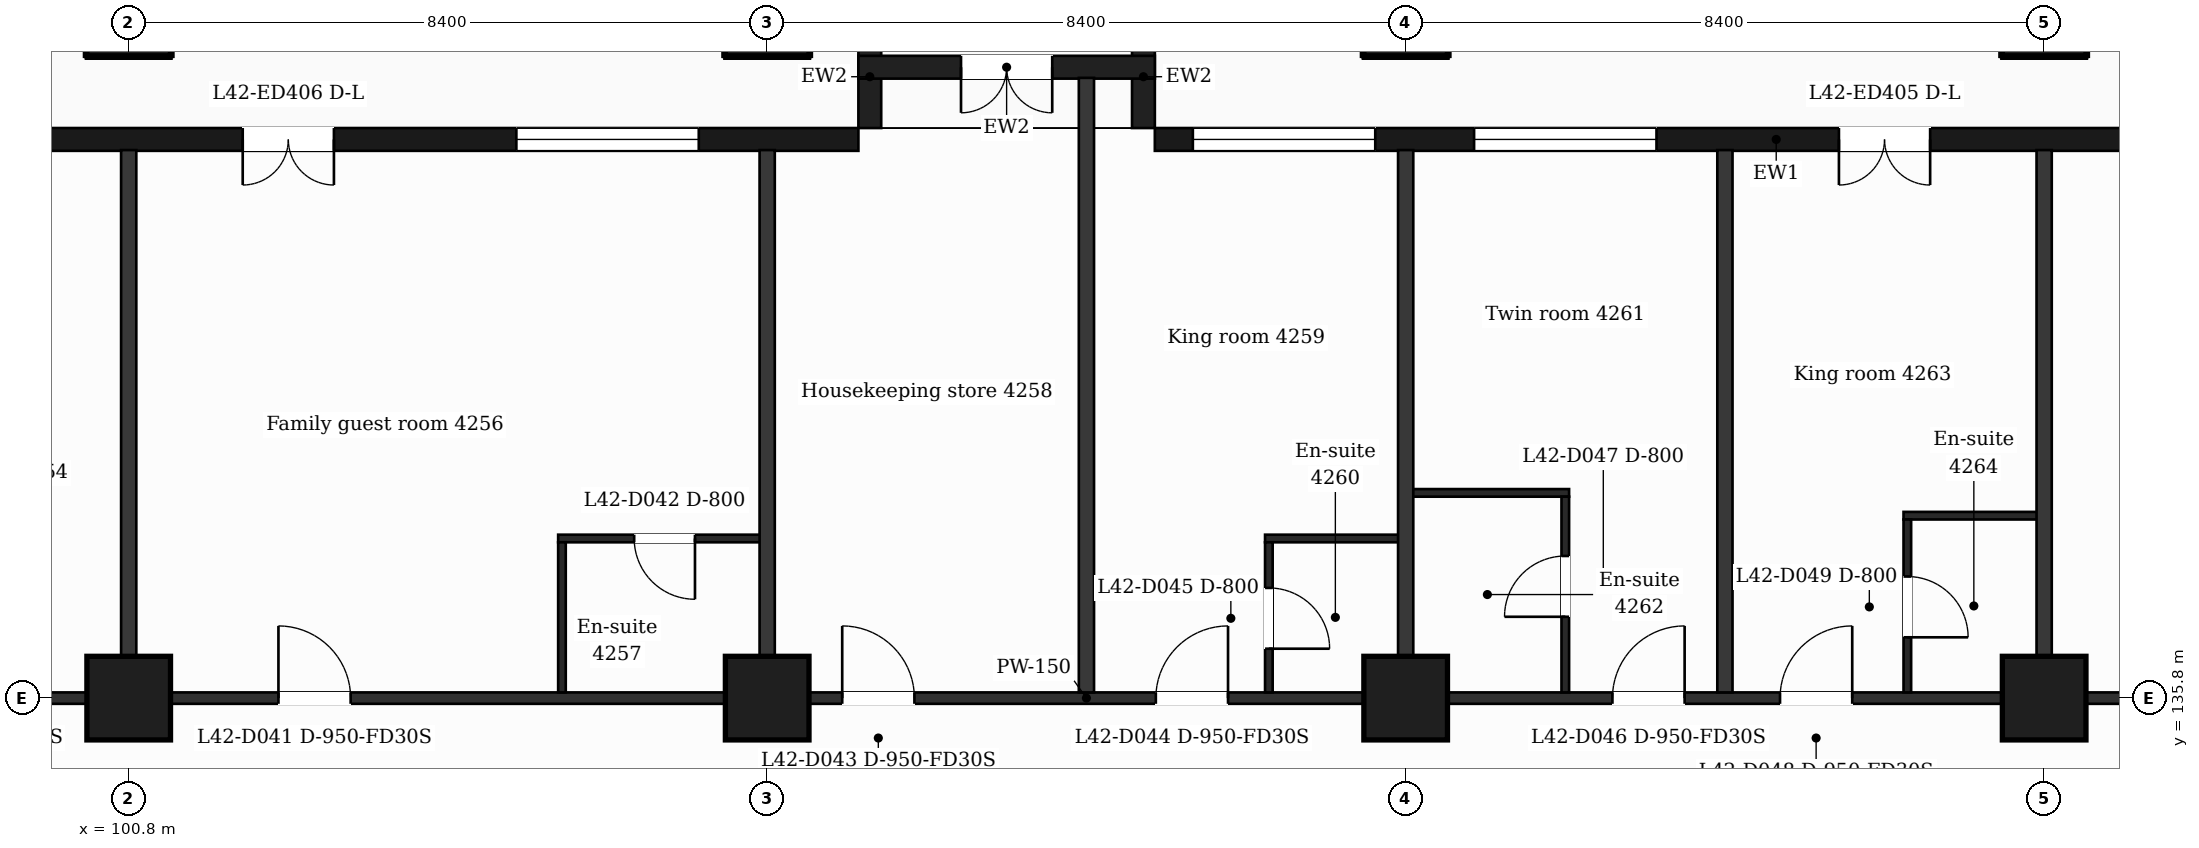
"""IFC4 building model, lengths in metres.
Left out: names, types, materials, properties, quantities, classifications, styles, units other than length and angle.
Written with IfcOpenShell. Run it as: python <this file> out.ifc"""

import sys

from ifc_helpers import new_model, si_unit, direction, frame, frame_2d, origin, origin_2d, place, context, subcontext, project, spatial, rectangle, extrude, element, fill, save


model = new_model("IFC4")
c1 = context("Model", 3, precision=1e-05, world=origin(), true_north=direction((0.0, 1.0)))
c2 = subcontext(c1, "Body", "Model", "MODEL_VIEW")
j1 = project(units=[si_unit("LENGTHUNIT", "METRE"), si_unit("PLANEANGLEUNIT", "RADIAN")], contexts=[c1])
p1 = place(None, origin())
s1 = spatial("IfcSite", under=j1, at=p1, CompositionType="ELEMENT")
p2 = place(p1, origin())
s2 = spatial("IfcBuilding", under=s1, at=p2, CompositionType="ELEMENT")
p3 = place(p2, frame((0.0, 0.0, 177.4)))
s3 = spatial("IfcBuildingStorey", under=s2, at=p3, CompositionType="ELEMENT", Elevation=177.4)
for number, where, z_axis, x_axis in (
    (1, (100.8, 135.8, 0.0), (0.0, 0.0, 1.0), (1.0, 0.0, 0.0)),
    (2, (109.2, 135.8, 0.0), (0.0, 0.0, 1.0), (1.0, 0.0, 0.0)),
    (3, (117.6, 135.8, 0.0), (0.0, 0.0, 1.0), (1.0, 0.0, 0.0)),
    (4, (126.0, 135.8, 0.0), (0.0, 0.0, 1.0), (1.0, 0.0, 0.0)),
    (5, (100.8, 144.8, 0.0), (0.0, 0.0, 1.0), (1.0, 0.0, 0.0)),
    (6, (109.2, 144.8, 0.0), (0.0, 0.0, 1.0), (1.0, 0.0, 0.0)),
    (7, (117.6, 144.8, 0.0), (0.0, 0.0, 1.0), (1.0, 0.0, 0.0)),
    (8, (126.0, 144.8, 0.0), (0.0, 0.0, 1.0), (1.0, 0.0, 0.0)),
):
    element("IfcColumn", number, at=place(p3, frame(where, z_axis=z_axis, x_axis=x_axis)), inside=s3, PredefinedType="COLUMN", context=c2, shape_type="SweptSolid", body=[
        extrude(rectangle(XDim=1.1, YDim=1.1, at=origin_2d()), origin(), (0.0, 0.0, 1.0), 3.7),
    ])
p4 = place(p3, frame((130.65, 143.15, 0.0), z_axis=(0.0, 0.0, 1.0), x_axis=(-1.0, 0.0, 0.0)))
e9 = element("IfcWall", 9, at=p4, inside=s3, PredefinedType="SOLIDWALL", context=c2, shape_type="SweptSolid", body=[
    extrude(rectangle(XDim=16.35, YDim=0.3, at=frame_2d((8.175, 0.0))), origin(), (0.0, 0.0, 1.0), 3.38),
])
p5 = place(p4, frame((1.95, 0.0, 0.9)))
e10 = element("IfcOpeningElement", 10, at=p5, cuts=e9, PredefinedType="OPENING", context=c2, shape_type="SweptSolid", body=[
    extrude(rectangle(XDim=1.2, YDim=2.1, at=frame_2d((0.6, 1.05))), frame((0.0, 0.16, 0.0), z_axis=(0.0, -1.0, 0.0), x_axis=(1.0, 0.0, 0.0)), (0.0, 0.0, 1.0), 0.32),
])
p6 = place(p4, frame((6.15, 0.0, 0.0)))
e11 = element("IfcOpeningElement", 11, at=p6, cuts=e9, PredefinedType="OPENING", context=c2, shape_type="SweptSolid", body=[
    extrude(rectangle(XDim=1.2, YDim=2.4, at=frame_2d((0.6, 1.2))), frame((0.0, 0.16, 0.0), z_axis=(0.0, -1.0, 0.0), x_axis=(1.0, 0.0, 0.0)), (0.0, 0.0, 1.0), 0.32),
])
p7 = place(p4, frame((9.75, 0.0, 0.9)))
e12 = element("IfcOpeningElement", 12, at=p7, cuts=e9, PredefinedType="OPENING", context=c2, shape_type="SweptSolid", body=[
    extrude(rectangle(XDim=2.4, YDim=2.1, at=frame_2d((1.2, 1.05))), frame((0.0, 0.16, 0.0), z_axis=(0.0, -1.0, 0.0), x_axis=(1.0, 0.0, 0.0)), (0.0, 0.0, 1.0), 0.32),
])
p8 = place(p4, frame((13.45, 0.0, 0.9)))
e13 = element("IfcOpeningElement", 13, at=p8, cuts=e9, PredefinedType="OPENING", context=c2, shape_type="SweptSolid", body=[
    extrude(rectangle(XDim=2.4, YDim=2.1, at=frame_2d((1.2, 1.05))), frame((0.0, 0.16, 0.0), z_axis=(0.0, -1.0, 0.0), x_axis=(1.0, 0.0, 0.0)), (0.0, 0.0, 1.0), 0.32),
])
p9 = place(p3, frame((110.4, 143.15, 0.0), z_axis=(0.0, 0.0, 1.0), x_axis=(-1.0, 0.0, 0.0)))
e14 = element("IfcWall", 14, at=p9, inside=s3, PredefinedType="SOLIDWALL", context=c2, shape_type="SweptSolid", body=[
    extrude(rectangle(XDim=14.4, YDim=0.3, at=frame_2d((7.2, 0.0))), origin(), (0.0, 0.0, 1.0), 3.38),
])
p10 = place(p9, frame((2.1, 0.0, 0.9)))
e15 = element("IfcOpeningElement", 15, at=p10, cuts=e14, PredefinedType="OPENING", context=c2, shape_type="SweptSolid", body=[
    extrude(rectangle(XDim=2.4, YDim=2.1, at=frame_2d((1.2, 1.05))), frame((0.0, 0.16, 0.0), z_axis=(0.0, -1.0, 0.0), x_axis=(1.0, 0.0, 0.0)), (0.0, 0.0, 1.0), 0.32),
])
p11 = place(p9, frame((6.9, 0.0, 0.0)))
e16 = element("IfcOpeningElement", 16, at=p11, cuts=e14, PredefinedType="OPENING", context=c2, shape_type="SweptSolid", body=[
    extrude(rectangle(XDim=1.2, YDim=2.4, at=frame_2d((0.6, 1.2))), frame((0.0, 0.16, 0.0), z_axis=(0.0, -1.0, 0.0), x_axis=(1.0, 0.0, 0.0)), (0.0, 0.0, 1.0), 0.32),
])
p12 = place(p9, frame((11.1, 0.0, 0.9)))
e17 = element("IfcOpeningElement", 17, at=p12, cuts=e14, PredefinedType="OPENING", context=c2, shape_type="SweptSolid", body=[
    extrude(rectangle(XDim=1.2, YDim=2.1, at=frame_2d((0.6, 1.05))), frame((0.0, 0.16, 0.0), z_axis=(0.0, -1.0, 0.0), x_axis=(1.0, 0.0, 0.0)), (0.0, 0.0, 1.0), 0.32),
])
for number, where, z_axis, x_axis in (
    (18, (114.15, 143.3, 0.0), (0.0, 0.0, 1.0), (0.0, 1.0, 0.0)),
    (19, (110.55, 143.3, 0.0), (0.0, 0.0, 1.0), (0.0, 1.0, 0.0)),
):
    element("IfcWall", number, at=place(p3, frame(where, z_axis=z_axis, x_axis=x_axis)), inside=s3, PredefinedType="SOLIDWALL", context=c2, shape_type="SweptSolid", body=[
        extrude(rectangle(XDim=1.35, YDim=0.3, at=frame_2d((0.675, 0.0))), origin(), (0.0, 0.0, 1.0), 3.38),
    ])
p13 = place(p3, frame((114.3, 144.1, 0.0), z_axis=(0.0, 0.0, 1.0), x_axis=(-1.0, 0.0, 0.0)))
e20 = element("IfcWall", 20, at=p13, inside=s3, PredefinedType="SOLIDWALL", context=c2, shape_type="SweptSolid", body=[
    extrude(rectangle(XDim=3.9, YDim=0.3, at=frame_2d((1.95, 0.0))), origin(), (0.0, 0.0, 1.0), 3.38),
])
p14 = place(p13, frame((1.35, 0.0, 0.0)))
e21 = element("IfcOpeningElement", 21, at=p14, cuts=e20, PredefinedType="OPENING", context=c2, shape_type="SweptSolid", body=[
    extrude(rectangle(XDim=1.2, YDim=2.4, at=frame_2d((0.6, 1.2))), frame((0.0, 0.16, 0.0), z_axis=(0.0, -1.0, 0.0), x_axis=(1.0, 0.0, 0.0)), (0.0, 0.0, 1.0), 0.32),
])
p15 = place(p3, frame((90.895, 135.8, 0.0), z_axis=(0.0, 0.0, 1.0), x_axis=(1.0, 0.0, 0.0)))
e22 = element("IfcWall", 22, at=p15, inside=s3, PredefinedType="PARTITIONING", context=c2, shape_type="SweptSolid", body=[
    extrude(rectangle(XDim=45.011, YDim=0.15, at=frame_2d((22.505, 0.0))), origin(), (0.0, 0.0, 1.0), 3.38),
])
p16 = place(p15, frame((6.906, 0.0, 0.0)))
e23 = element("IfcOpeningElement", 23, at=p16, cuts=e22, PredefinedType="OPENING", context=c2, shape_type="SweptSolid", body=[
    extrude(rectangle(XDim=1.0, YDim=2.1, at=frame_2d((0.5, 1.05))), frame((0.0, 0.085, 0.0), z_axis=(0.0, -1.0, 0.0), x_axis=(1.0, 0.0, 0.0)), (0.0, 0.0, 1.0), 0.17),
])
p17 = place(p15, frame((11.875, 0.0, 0.0)))
e24 = element("IfcOpeningElement", 24, at=p17, cuts=e22, PredefinedType="OPENING", context=c2, shape_type="SweptSolid", body=[
    extrude(rectangle(XDim=0.95, YDim=2.1, at=frame_2d((0.475, 1.05))), frame((0.0, 0.085, 0.0), z_axis=(0.0, -1.0, 0.0), x_axis=(1.0, 0.0, 0.0)), (0.0, 0.0, 1.0), 0.17),
])
p18 = place(p15, frame((19.292, 0.0, 0.0)))
e25 = element("IfcOpeningElement", 25, at=p18, cuts=e22, PredefinedType="OPENING", context=c2, shape_type="SweptSolid", body=[
    extrude(rectangle(XDim=0.95, YDim=2.1, at=frame_2d((0.475, 1.05))), frame((0.0, 0.085, 0.0), z_axis=(0.0, -1.0, 0.0), x_axis=(1.0, 0.0, 0.0)), (0.0, 0.0, 1.0), 0.17),
])
p19 = place(p15, frame((23.418, 0.0, 0.0)))
e26 = element("IfcOpeningElement", 26, at=p19, cuts=e22, PredefinedType="OPENING", context=c2, shape_type="SweptSolid", body=[
    extrude(rectangle(XDim=0.95, YDim=2.1, at=frame_2d((0.475, 1.05))), frame((0.0, 0.085, 0.0), z_axis=(0.0, -1.0, 0.0), x_axis=(1.0, 0.0, 0.0)), (0.0, 0.0, 1.0), 0.17),
])
p20 = place(p15, frame((29.425, 0.0, 0.0)))
e27 = element("IfcOpeningElement", 27, at=p20, cuts=e22, PredefinedType="OPENING", context=c2, shape_type="SweptSolid", body=[
    extrude(rectangle(XDim=0.95, YDim=2.1, at=frame_2d((0.475, 1.05))), frame((0.0, 0.085, 0.0), z_axis=(0.0, -1.0, 0.0), x_axis=(1.0, 0.0, 0.0)), (0.0, 0.0, 1.0), 0.17),
])
p21 = place(p15, frame((31.63, 0.0, 0.0)))
e28 = element("IfcOpeningElement", 28, at=p21, cuts=e22, PredefinedType="OPENING", context=c2, shape_type="SweptSolid", body=[
    extrude(rectangle(XDim=0.95, YDim=2.1, at=frame_2d((0.475, 1.05))), frame((0.0, 0.085, 0.0), z_axis=(0.0, -1.0, 0.0), x_axis=(1.0, 0.0, 0.0)), (0.0, 0.0, 1.0), 0.17),
])
p22 = place(p15, frame((39.814, 0.0, 0.0)))
e29 = element("IfcOpeningElement", 29, at=p22, cuts=e22, PredefinedType="OPENING", context=c2, shape_type="SweptSolid", body=[
    extrude(rectangle(XDim=0.95, YDim=2.1, at=frame_2d((0.475, 1.05))), frame((0.0, 0.085, 0.0), z_axis=(0.0, -1.0, 0.0), x_axis=(1.0, 0.0, 0.0)), (0.0, 0.0, 1.0), 0.17),
])
p23 = place(p3, frame((106.45, 137.9, 0.0), z_axis=(0.0, 0.0, 1.0), x_axis=(1.0, 0.0, 0.0)))
e30 = element("IfcWall", 30, at=p23, inside=s3, PredefinedType="PARTITIONING", context=c2, shape_type="SweptSolid", body=[
    extrude(rectangle(XDim=2.75, YDim=0.1, at=frame_2d((1.375, 0.0))), origin(), (0.0, 0.0, 1.0), 3.38),
])
p24 = place(p23, frame((1.0, 0.0, 0.0)))
e31 = element("IfcOpeningElement", 31, at=p24, cuts=e30, PredefinedType="OPENING", context=c2, shape_type="SweptSolid", body=[
    extrude(rectangle(XDim=0.8, YDim=2.1, at=frame_2d((0.4, 1.05))), frame((0.0, 0.06, 0.0), z_axis=(0.0, -1.0, 0.0), x_axis=(1.0, 0.0, 0.0)), (0.0, 0.0, 1.0), 0.12),
])
for number, where, z_axis, x_axis in (
    (32, (115.75, 137.9, 0.0), (0.0, 0.0, 1.0), (1.0, 0.0, 0.0)),
    (33, (124.15, 138.2, 0.0), (0.0, 0.0, 1.0), (1.0, 0.0, 0.0)),
):
    element("IfcWall", number, at=place(p3, frame(where, z_axis=z_axis, x_axis=x_axis)), inside=s3, PredefinedType="PARTITIONING", context=c2, shape_type="SweptSolid", body=[
        extrude(rectangle(XDim=1.85, YDim=0.1, at=frame_2d((0.925, 0.0))), origin(), (0.0, 0.0, 1.0), 3.38),
    ])
p25 = place(p3, frame((117.6, 138.5, 0.0), z_axis=(0.0, 0.0, 1.0), x_axis=(1.0, 0.0, 0.0)))
e34 = element("IfcWall", 34, at=p25, inside=s3, PredefinedType="PARTITIONING", context=c2, shape_type="SweptSolid", body=[
    extrude(rectangle(XDim=2.15, YDim=0.1, at=frame_2d((1.075, 0.0))), origin(), (0.0, 0.0, 1.0), 3.38),
])
p26 = place(p3, frame((100.8, 135.875, 0.0), z_axis=(0.0, 0.0, 1.0), x_axis=(0.0, 1.0, 0.0)))
e35 = element("IfcWall", 35, at=p26, inside=s3, PredefinedType="PARTITIONING", context=c2, shape_type="SweptSolid", body=[
    extrude(rectangle(XDim=7.135, YDim=0.2, at=frame_2d((3.567, 0.0))), origin(), (0.0, 0.0, 1.0), 3.38),
])
p27 = place(p3, frame((106.5, 135.875, 0.0), z_axis=(0.0, 0.0, 1.0), x_axis=(0.0, 1.0, 0.0)))
e36 = element("IfcWall", 36, at=p27, inside=s3, PredefinedType="PARTITIONING", context=c2, shape_type="SweptSolid", body=[
    extrude(rectangle(XDim=1.975, YDim=0.1, at=frame_2d((0.988, 0.0))), origin(), (0.0, 0.0, 1.0), 3.38),
])
p28 = place(p3, frame((109.2, 135.875, 0.0), z_axis=(0.0, 0.0, 1.0), x_axis=(0.0, 1.0, 0.0)))
e37 = element("IfcWall", 37, at=p28, inside=s3, PredefinedType="PARTITIONING", context=c2, shape_type="SweptSolid", body=[
    extrude(rectangle(XDim=7.135, YDim=0.2, at=frame_2d((3.567, 0.0))), origin(), (0.0, 0.0, 1.0), 3.38),
])
p29 = place(p3, frame((113.4, 135.875, 0.0), z_axis=(0.0, 0.0, 1.0), x_axis=(0.0, 1.0, 0.0)))
e38 = element("IfcWall", 38, at=p29, inside=s3, PredefinedType="PARTITIONING", context=c2, shape_type="SweptSolid", body=[
    extrude(rectangle(XDim=8.085, YDim=0.2, at=frame_2d((4.042, 0.0))), origin(), (0.0, 0.0, 1.0), 3.38),
])
p30 = place(p3, frame((115.8, 135.875, 0.0), z_axis=(0.0, 0.0, 1.0), x_axis=(0.0, 1.0, 0.0)))
e39 = element("IfcWall", 39, at=p30, inside=s3, PredefinedType="PARTITIONING", context=c2, shape_type="SweptSolid", body=[
    extrude(rectangle(XDim=1.975, YDim=0.1, at=frame_2d((0.988, 0.0))), origin(), (0.0, 0.0, 1.0), 3.38),
])
p31 = place(p30, frame((0.575, 0.0, 0.0)))
e40 = element("IfcOpeningElement", 40, at=p31, cuts=e39, PredefinedType="OPENING", context=c2, shape_type="SweptSolid", body=[
    extrude(rectangle(XDim=0.8, YDim=2.1, at=frame_2d((0.4, 1.05))), frame((0.0, 0.06, 0.0), z_axis=(0.0, -1.0, 0.0), x_axis=(1.0, 0.0, 0.0)), (0.0, 0.0, 1.0), 0.12),
])
p32 = place(p3, frame((117.6, 135.875, 0.0), z_axis=(0.0, 0.0, 1.0), x_axis=(0.0, 1.0, 0.0)))
e41 = element("IfcWall", 41, at=p32, inside=s3, PredefinedType="PARTITIONING", context=c2, shape_type="SweptSolid", body=[
    extrude(rectangle(XDim=7.135, YDim=0.2, at=frame_2d((3.567, 0.0))), origin(), (0.0, 0.0, 1.0), 3.38),
])
p33 = place(p3, frame((119.7, 135.875, 0.0), z_axis=(0.0, 0.0, 1.0), x_axis=(0.0, 1.0, 0.0)))
e42 = element("IfcWall", 42, at=p33, inside=s3, PredefinedType="PARTITIONING", context=c2, shape_type="SweptSolid", body=[
    extrude(rectangle(XDim=2.575, YDim=0.1, at=frame_2d((1.288, 0.0))), origin(), (0.0, 0.0, 1.0), 3.38),
])
p34 = place(p33, frame((0.995, 0.0, 0.0)))
e43 = element("IfcOpeningElement", 43, at=p34, cuts=e42, PredefinedType="OPENING", context=c2, shape_type="SweptSolid", body=[
    extrude(rectangle(XDim=0.8, YDim=2.1, at=frame_2d((0.4, 1.05))), frame((0.0, 0.06, 0.0), z_axis=(0.0, -1.0, 0.0), x_axis=(1.0, 0.0, 0.0)), (0.0, 0.0, 1.0), 0.12),
])
p35 = place(p3, frame((121.8, 135.875, 0.0), z_axis=(0.0, 0.0, 1.0), x_axis=(0.0, 1.0, 0.0)))
e44 = element("IfcWall", 44, at=p35, inside=s3, PredefinedType="PARTITIONING", context=c2, shape_type="SweptSolid", body=[
    extrude(rectangle(XDim=7.135, YDim=0.2, at=frame_2d((3.567, 0.0))), origin(), (0.0, 0.0, 1.0), 3.38),
])
p36 = place(p3, frame((124.2, 135.875, 0.0), z_axis=(0.0, 0.0, 1.0), x_axis=(0.0, 1.0, 0.0)))
e45 = element("IfcWall", 45, at=p36, inside=s3, PredefinedType="PARTITIONING", context=c2, shape_type="SweptSolid", body=[
    extrude(rectangle(XDim=2.275, YDim=0.1, at=frame_2d((1.137, 0.0))), origin(), (0.0, 0.0, 1.0), 3.38),
])
p37 = place(p36, frame((0.725, 0.0, 0.0)))
e46 = element("IfcOpeningElement", 46, at=p37, cuts=e45, PredefinedType="OPENING", context=c2, shape_type="SweptSolid", body=[
    extrude(rectangle(XDim=0.8, YDim=2.1, at=frame_2d((0.4, 1.05))), frame((0.0, 0.06, 0.0), z_axis=(0.0, -1.0, 0.0), x_axis=(1.0, 0.0, 0.0)), (0.0, 0.0, 1.0), 0.12),
])
p38 = place(p3, frame((126.0, 135.875, 0.0), z_axis=(0.0, 0.0, 1.0), x_axis=(0.0, 1.0, 0.0)))
e47 = element("IfcWall", 47, at=p38, inside=s3, PredefinedType="PARTITIONING", context=c2, shape_type="SweptSolid", body=[
    extrude(rectangle(XDim=7.135, YDim=0.2, at=frame_2d((3.567, 0.0))), origin(), (0.0, 0.0, 1.0), 3.38),
])
p39 = place(p6, origin())
e48 = element("IfcDoor", 48, at=p39, inside=s3, OperationType="DOUBLE_DOOR_SINGLE_SWING", PredefinedType="DOOR", context=c2, shape_type="SweptSolid", body=[
    extrude(rectangle(XDim=1.2, YDim=2.4, at=frame_2d((0.6, 1.2))), frame((0.0, 0.025, 0.0), z_axis=(0.0, -1.0, 0.0), x_axis=(1.0, 0.0, 0.0)), (0.0, 0.0, 1.0), 0.05),
])
fill(e11, e48)
p40 = place(p7, origin())
e49 = element("IfcWindow", 49, at=p40, inside=s3, PartitioningType="SINGLE_PANEL", PredefinedType="WINDOW", context=c2, shape_type="SweptSolid", body=[
    extrude(rectangle(XDim=2.4, YDim=2.1, at=frame_2d((1.2, 1.05))), frame((0.0, 0.03, 0.0), z_axis=(0.0, -1.0, 0.0), x_axis=(1.0, 0.0, 0.0)), (0.0, 0.0, 1.0), 0.06),
])
fill(e12, e49)
p41 = place(p8, origin())
e50 = element("IfcWindow", 50, at=p41, inside=s3, PartitioningType="SINGLE_PANEL", PredefinedType="WINDOW", context=c2, shape_type="SweptSolid", body=[
    extrude(rectangle(XDim=2.4, YDim=2.1, at=frame_2d((1.2, 1.05))), frame((0.0, 0.03, 0.0), z_axis=(0.0, -1.0, 0.0), x_axis=(1.0, 0.0, 0.0)), (0.0, 0.0, 1.0), 0.06),
])
fill(e13, e50)
p42 = place(p10, origin())
e51 = element("IfcWindow", 51, at=p42, inside=s3, PartitioningType="SINGLE_PANEL", PredefinedType="WINDOW", context=c2, shape_type="SweptSolid", body=[
    extrude(rectangle(XDim=2.4, YDim=2.1, at=frame_2d((1.2, 1.05))), frame((0.0, 0.03, 0.0), z_axis=(0.0, -1.0, 0.0), x_axis=(1.0, 0.0, 0.0)), (0.0, 0.0, 1.0), 0.06),
])
fill(e15, e51)
p43 = place(p11, origin())
e52 = element("IfcDoor", 52, at=p43, inside=s3, OperationType="DOUBLE_DOOR_SINGLE_SWING", PredefinedType="DOOR", context=c2, shape_type="SweptSolid", body=[
    extrude(rectangle(XDim=1.2, YDim=2.4, at=frame_2d((0.6, 1.2))), frame((0.0, 0.025, 0.0), z_axis=(0.0, -1.0, 0.0), x_axis=(1.0, 0.0, 0.0)), (0.0, 0.0, 1.0), 0.05),
])
fill(e16, e52)
p44 = place(p14, origin())
e53 = element("IfcDoor", 53, at=p44, inside=s3, OperationType="DOUBLE_DOOR_SINGLE_SWING", PredefinedType="DOOR", context=c2, shape_type="SweptSolid", body=[
    extrude(rectangle(XDim=1.2, YDim=2.4, at=frame_2d((0.6, 1.2))), frame((0.0, 0.025, 0.0), z_axis=(0.0, -1.0, 0.0), x_axis=(1.0, 0.0, 0.0)), (0.0, 0.0, 1.0), 0.05),
])
fill(e21, e53)
p45 = place(p17, origin())
e54 = element("IfcDoor", 54, at=p45, inside=s3, OperationType="SINGLE_SWING_LEFT", PredefinedType="DOOR", context=c2, shape_type="SweptSolid", body=[
    extrude(rectangle(XDim=0.95, YDim=2.1, at=frame_2d((0.475, 1.05))), frame((0.0, 0.025, 0.0), z_axis=(0.0, -1.0, 0.0), x_axis=(1.0, 0.0, 0.0)), (0.0, 0.0, 1.0), 0.05),
])
fill(e24, e54)
p46 = place(p24, origin())
e55 = element("IfcDoor", 55, at=p46, inside=s3, OperationType="SINGLE_SWING_RIGHT", PredefinedType="DOOR", context=c2, shape_type="SweptSolid", body=[
    extrude(rectangle(XDim=0.8, YDim=2.1, at=frame_2d((0.4, 1.05))), frame((0.0, 0.025, 0.0), z_axis=(0.0, -1.0, 0.0), x_axis=(1.0, 0.0, 0.0)), (0.0, 0.0, 1.0), 0.05),
])
fill(e31, e55)
p47 = place(p18, origin())
e56 = element("IfcDoor", 56, at=p47, inside=s3, OperationType="SINGLE_SWING_LEFT", PredefinedType="DOOR", context=c2, shape_type="SweptSolid", body=[
    extrude(rectangle(XDim=0.95, YDim=2.1, at=frame_2d((0.475, 1.05))), frame((0.0, 0.025, 0.0), z_axis=(0.0, -1.0, 0.0), x_axis=(1.0, 0.0, 0.0)), (0.0, 0.0, 1.0), 0.05),
])
fill(e25, e56)
p48 = place(p19, origin())
e57 = element("IfcDoor", 57, at=p48, inside=s3, OperationType="SINGLE_SWING_RIGHT", PredefinedType="DOOR", context=c2, shape_type="SweptSolid", body=[
    extrude(rectangle(XDim=0.95, YDim=2.1, at=frame_2d((0.475, 1.05))), frame((0.0, 0.025, 0.0), z_axis=(0.0, -1.0, 0.0), x_axis=(1.0, 0.0, 0.0)), (0.0, 0.0, 1.0), 0.05),
])
fill(e26, e57)
p49 = place(p31, origin())
e58 = element("IfcDoor", 58, at=p49, inside=s3, OperationType="SINGLE_SWING_LEFT", PredefinedType="DOOR", context=c2, shape_type="SweptSolid", body=[
    extrude(rectangle(XDim=0.8, YDim=2.1, at=frame_2d((0.4, 1.05))), frame((0.0, 0.025, 0.0), z_axis=(0.0, -1.0, 0.0), x_axis=(1.0, 0.0, 0.0)), (0.0, 0.0, 1.0), 0.05),
])
fill(e40, e58)
p50 = place(p20, origin())
e59 = element("IfcDoor", 59, at=p50, inside=s3, OperationType="SINGLE_SWING_RIGHT", PredefinedType="DOOR", context=c2, shape_type="SweptSolid", body=[
    extrude(rectangle(XDim=0.95, YDim=2.1, at=frame_2d((0.475, 1.05))), frame((0.0, 0.025, 0.0), z_axis=(0.0, -1.0, 0.0), x_axis=(1.0, 0.0, 0.0)), (0.0, 0.0, 1.0), 0.05),
])
fill(e27, e59)
p51 = place(p34, origin())
e60 = element("IfcDoor", 60, at=p51, inside=s3, OperationType="SINGLE_SWING_LEFT", PredefinedType="DOOR", context=c2, shape_type="SweptSolid", body=[
    extrude(rectangle(XDim=0.8, YDim=2.1, at=frame_2d((0.4, 1.05))), frame((0.0, 0.025, 0.0), z_axis=(0.0, -1.0, 0.0), x_axis=(1.0, 0.0, 0.0)), (0.0, 0.0, 1.0), 0.05),
])
fill(e43, e60)
p52 = place(p21, origin())
e61 = element("IfcDoor", 61, at=p52, inside=s3, OperationType="SINGLE_SWING_RIGHT", PredefinedType="DOOR", context=c2, shape_type="SweptSolid", body=[
    extrude(rectangle(XDim=0.95, YDim=2.1, at=frame_2d((0.475, 1.05))), frame((0.0, 0.025, 0.0), z_axis=(0.0, -1.0, 0.0), x_axis=(1.0, 0.0, 0.0)), (0.0, 0.0, 1.0), 0.05),
])
fill(e28, e61)
p53 = place(p37, origin())
e62 = element("IfcDoor", 62, at=p53, inside=s3, OperationType="SINGLE_SWING_LEFT", PredefinedType="DOOR", context=c2, shape_type="SweptSolid", body=[
    extrude(rectangle(XDim=0.8, YDim=2.1, at=frame_2d((0.4, 1.05))), frame((0.0, 0.025, 0.0), z_axis=(0.0, -1.0, 0.0), x_axis=(1.0, 0.0, 0.0)), (0.0, 0.0, 1.0), 0.05),
])
fill(e46, e62)
save(model, sys.argv[1])
